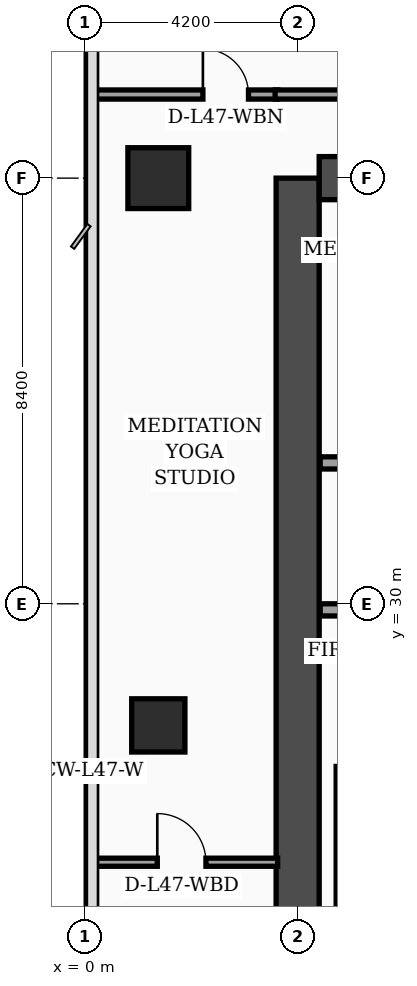
"""IFC4 building model, lengths in metres.
Left out: names, types, materials, properties, quantities, classifications, styles, units other than length and angle.
Written with IfcOpenShell. Run it as: python <this file> out.ifc"""

import sys

from ifc_helpers import new_model, si_unit, direction, frame, frame_2d, origin, origin_2d, place, context, subcontext, project, spatial, rectangle, extrude, element, fill, save


model = new_model("IFC4")
c1 = context("Model", 3, precision=1e-05, world=origin(), true_north=direction((0.0, 1.0)))
c2 = subcontext(c1, "Body", "Model", "MODEL_VIEW")
j1 = project(units=[si_unit("LENGTHUNIT", "METRE"), si_unit("PLANEANGLEUNIT", "RADIAN")], contexts=[c1])
p1 = place(None, origin())
s1 = spatial("IfcSite", under=j1, at=p1, CompositionType="ELEMENT")
p2 = place(p1, origin())
s2 = spatial("IfcBuilding", under=s1, at=p2, CompositionType="ELEMENT")
p3 = place(p2, frame((0.0, 0.0, 191.3)))
s3 = spatial("IfcBuildingStorey", under=s2, at=p3, CompositionType="ELEMENT", Elevation=191.3)
p4 = place(p3, frame((4.2, 16.8, 0.0), z_axis=(0.0, 0.0, 1.0), x_axis=(0.0, 1.0, 0.0)))
e1 = element("IfcWall", 1, at=p4, inside=s3, PredefinedType="SHEAR", context=c2, shape_type="SweptSolid", body=[
    extrude(rectangle(XDim=21.6, YDim=0.85, at=frame_2d((10.8, 0.0))), origin(), (0.0, 0.0, 1.0), 3.56),
])
p5 = place(p3, frame((4.625, 38.4, 0.0), z_axis=(0.0, 0.0, 1.0), x_axis=(1.0, 0.0, 0.0)))
e2 = element("IfcWall", 2, at=p5, inside=s3, PredefinedType="SHEAR", context=c2, shape_type="SweptSolid", body=[
    extrude(rectangle(XDim=9.95, YDim=0.85, at=frame_2d((4.975, 0.0))), origin(), (0.0, 0.0, 1.0), 3.56),
])
p6 = place(p3, frame((5.08, 17.225, 0.0), z_axis=(0.0, 0.0, 1.0), x_axis=(0.0, 1.0, 0.0)))
e3 = element("IfcWall", 3, at=p6, inside=s3, PredefinedType="SOLIDWALL", context=c2, shape_type="SweptSolid", body=[
    extrude(rectangle(XDim=9.565, YDim=0.24, at=frame_2d((4.782, 0.0))), origin(), (0.0, 0.0, 1.0), 3.56),
])
p7 = place(p3, frame((1.45, 27.6, 0.0), z_axis=(0.0, 0.0, 1.0), x_axis=(1.0, 0.0, 0.0)))
e4 = element("IfcColumn", 4, at=p7, inside=s3, PredefinedType="COLUMN", context=c2, shape_type="SweptSolid", body=[
    extrude(rectangle(XDim=1.05, YDim=1.05, at=origin_2d()), origin(), (0.0, 0.0, 1.0), 3.56),
])
p8 = place(p3, frame((1.45, 38.4, 0.0), z_axis=(0.0, 0.0, 1.0), x_axis=(1.0, 0.0, 0.0)))
e5 = element("IfcColumn", 5, at=p8, inside=s3, PredefinedType="COLUMN", context=c2, shape_type="SweptSolid", body=[
    extrude(rectangle(XDim=1.2, YDim=1.2, at=origin_2d()), origin(), (0.0, 0.0, 1.0), 3.56),
])
p9 = place(p3, frame((4.645, 29.88, 0.0), z_axis=(0.0, 0.0, 1.0), x_axis=(1.0, 0.0, 0.0)))
e6 = element("IfcWall", 6, at=p9, inside=s3, PredefinedType="SOLIDWALL", context=c2, shape_type="SweptSolid", body=[
    extrude(rectangle(XDim=4.775, YDim=0.24, at=frame_2d((2.387, 0.0))), origin(), (0.0, 0.0, 1.0), 3.56),
])
p10 = place(p9, frame((0.45, 0.0, 0.0)))
e7 = element("IfcOpeningElement", 7, at=p10, cuts=e6, PredefinedType="OPENING", context=c2, shape_type="SweptSolid", body=[
    extrude(rectangle(XDim=1.3, YDim=2.35, at=frame_2d((0.65, 1.175))), frame((0.0, 0.13, 0.0), z_axis=(0.0, -1.0, 0.0), x_axis=(1.0, 0.0, 0.0)), (0.0, 0.0, 1.0), 0.26),
])
p11 = place(p3, frame((4.645, 32.78, 0.0), z_axis=(0.0, 0.0, 1.0), x_axis=(1.0, 0.0, 0.0)))
e8 = element("IfcWall", 8, at=p11, inside=s3, PredefinedType="SOLIDWALL", context=c2, shape_type="SweptSolid", body=[
    extrude(rectangle(XDim=4.775, YDim=0.24, at=frame_2d((2.387, 0.0))), origin(), (0.0, 0.0, 1.0), 3.19),
])
p12 = place(p3, frame((0.08, 24.9, 0.0), z_axis=(0.0, 0.0, 1.0), x_axis=(1.0, 0.0, 0.0)))
e9 = element("IfcWall", 9, at=p12, inside=s3, PredefinedType="PARTITIONING", context=c2, shape_type="SweptSolid", body=[
    extrude(rectangle(XDim=3.725, YDim=0.16, at=frame_2d((1.862, 0.0))), origin(), (0.0, 0.0, 1.0), 3.09),
])
p13 = place(p12, frame((1.35, 0.0, 0.0)))
e10 = element("IfcOpeningElement", 10, at=p13, cuts=e9, PredefinedType="OPENING", context=c2, shape_type="SweptSolid", body=[
    extrude(rectangle(XDim=0.96, YDim=2.2, at=frame_2d((0.48, 1.1))), frame((0.0, 0.09, 0.0), z_axis=(0.0, -1.0, 0.0), x_axis=(1.0, 0.0, 0.0)), (0.0, 0.0, 1.0), 0.18),
])
p14 = place(p3, frame((0.08, 40.05, 0.0), z_axis=(0.0, 0.0, 1.0), x_axis=(1.0, 0.0, 0.0)))
e11 = element("IfcWall", 11, at=p14, inside=s3, PredefinedType="PARTITIONING", context=c2, shape_type="SweptSolid", body=[
    extrude(rectangle(XDim=3.725, YDim=0.18, at=frame_2d((1.862, 0.0))), origin(), (0.0, 0.0, 1.0), 2.94),
])
p15 = place(p14, frame((2.25, 0.0, 0.0)))
e12 = element("IfcOpeningElement", 12, at=p15, cuts=e11, PredefinedType="OPENING", context=c2, shape_type="SweptSolid", body=[
    extrude(rectangle(XDim=0.9, YDim=2.15, at=frame_2d((0.45, 1.075))), frame((0.0, 0.1, 0.0), z_axis=(0.0, -1.0, 0.0), x_axis=(1.0, 0.0, 0.0)), (0.0, 0.0, 1.0), 0.2),
])
p16 = place(p3, frame((3.755, 40.05, 0.0), z_axis=(0.0, 0.0, 1.0), x_axis=(1.0, 0.0, 0.0)))
e13 = element("IfcWall", 13, at=p16, inside=s3, PredefinedType="PARTITIONING", context=c2, shape_type="SweptSolid", body=[
    extrude(rectangle(XDim=11.395, YDim=0.18, at=frame_2d((5.698, 0.0))), origin(), (0.0, 0.0, 1.0), 2.94),
])
p17 = place(p13, origin())
e14 = element("IfcDoor", 14, at=p17, inside=s3, OperationType="SINGLE_SWING_LEFT", PredefinedType="DOOR", context=c2, shape_type="SweptSolid", body=[
    extrude(rectangle(XDim=0.96, YDim=2.2, at=frame_2d((0.48, 1.1))), frame((0.0, 0.025, 0.0), z_axis=(0.0, -1.0, 0.0), x_axis=(1.0, 0.0, 0.0)), (0.0, 0.0, 1.0), 0.05),
])
fill(e10, e14)
p18 = place(p15, origin())
e15 = element("IfcDoor", 15, at=p18, inside=s3, OperationType="SINGLE_SWING_LEFT", PredefinedType="DOOR", context=c2, shape_type="SweptSolid", body=[
    extrude(rectangle(XDim=0.9, YDim=2.15, at=frame_2d((0.45, 1.075))), frame((0.0, 0.025, 0.0), z_axis=(0.0, -1.0, 0.0), x_axis=(1.0, 0.0, 0.0)), (0.0, 0.0, 1.0), 0.05),
])
fill(e12, e15)
save(model, sys.argv[1])
